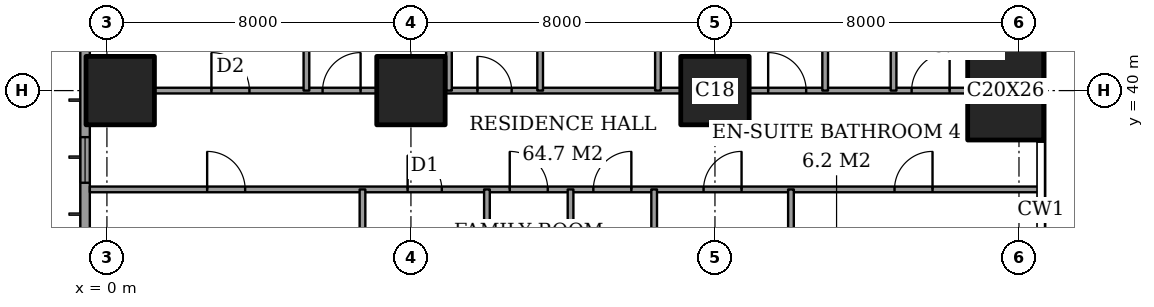
"""IFC4 building model, lengths in metres.
Left out: names, types, materials, properties, quantities, classifications, styles, units other than length and angle.
Written with IfcOpenShell. Run it as: python <this file> out.ifc"""

import sys

from ifc_helpers import new_model, si_unit, direction, frame, frame_2d, origin, origin_2d, place, context, subcontext, project, spatial, rectangle, extrude, element, fill, save


model = new_model("IFC4")
c1 = context("Model", 3, precision=1e-05, world=origin(), true_north=direction((0.0, 1.0)))
c2 = subcontext(c1, "Body", "Model", "MODEL_VIEW")
j1 = project(units=[si_unit("LENGTHUNIT", "METRE"), si_unit("PLANEANGLEUNIT", "RADIAN")], contexts=[c1])
p1 = place(None, origin())
s1 = spatial("IfcSite", under=j1, at=p1, CompositionType="ELEMENT")
p2 = place(p1, origin())
s2 = spatial("IfcBuilding", under=s1, at=p2, CompositionType="ELEMENT")
p3 = place(p2, frame((0.0, 0.0, 185.8)))
s3 = spatial("IfcBuildingStorey", under=s2, at=p3, CompositionType="ELEMENT", Elevation=185.8)
for number, where, z_axis, x_axis in (
    (1, (0.35, 40.0, 0.0), (0.0, 0.0, 1.0), (1.0, 0.0, 0.0)),
    (2, (8.0, 40.0, 0.0), (0.0, 0.0, 1.0), (1.0, 0.0, 0.0)),
    (3, (16.0, 40.0, 0.0), (0.0, 0.0, 1.0), (1.0, 0.0, 0.0)),
):
    element("IfcColumn", number, at=place(p3, frame(where, z_axis=z_axis, x_axis=x_axis)), inside=s3, PredefinedType="COLUMN", context=c2, shape_type="SweptSolid", body=[
        extrude(rectangle(XDim=1.8, YDim=1.8, at=origin_2d()), origin(), (0.0, 0.0, 1.0), 3.6),
    ])
p4 = place(p3, frame((23.65, 40.0, 0.0), z_axis=(0.0, 0.0, 1.0), x_axis=(1.0, 0.0, 0.0)))
e4 = element("IfcColumn", 4, at=p4, inside=s3, PredefinedType="COLUMN", context=c2, shape_type="SweptSolid", body=[
    extrude(rectangle(XDim=2.0, YDim=2.6, at=origin_2d()), origin(), (0.0, 0.0, 1.0), 3.6),
])
p5 = place(p3, frame((-0.575, 44.825, 0.0), z_axis=(0.0, 0.0, 1.0), x_axis=(0.0, -1.0, 0.0)))
e5 = element("IfcWall", 5, at=p5, inside=s3, PredefinedType="SOLIDWALL", context=c2, shape_type="SweptSolid", body=[
    extrude(rectangle(XDim=41.65, YDim=0.25, at=frame_2d((20.825, 0.0))), origin(), (0.0, 0.0, 1.0), 3.6),
])
p6 = place(p5, frame((0.825, 0.0, 0.2)))
e6 = element("IfcOpeningElement", 6, at=p6, cuts=e5, PredefinedType="OPENING", context=c2, shape_type="SweptSolid", body=[
    extrude(rectangle(XDim=2.4, YDim=2.4, at=frame_2d((1.2, 1.2))), frame((0.0, 0.135, 0.0), z_axis=(0.0, -1.0, 0.0), x_axis=(1.0, 0.0, 0.0)), (0.0, 0.0, 1.0), 0.27),
])
p7 = place(p5, frame((6.05, 0.0, 0.2)))
e7 = element("IfcOpeningElement", 7, at=p7, cuts=e5, PredefinedType="OPENING", context=c2, shape_type="SweptSolid", body=[
    extrude(rectangle(XDim=1.2, YDim=2.4, at=frame_2d((0.6, 1.2))), frame((0.0, 0.135, 0.0), z_axis=(0.0, -1.0, 0.0), x_axis=(1.0, 0.0, 0.0)), (0.0, 0.0, 1.0), 0.27),
])
p8 = place(p5, frame((8.475, 0.0, 0.2)))
e8 = element("IfcOpeningElement", 8, at=p8, cuts=e5, PredefinedType="OPENING", context=c2, shape_type="SweptSolid", body=[
    extrude(rectangle(XDim=2.4, YDim=2.4, at=frame_2d((1.2, 1.2))), frame((0.0, 0.135, 0.0), z_axis=(0.0, -1.0, 0.0), x_axis=(1.0, 0.0, 0.0)), (0.0, 0.0, 1.0), 0.27),
])
p9 = place(p5, frame((15.625, 0.0, 0.2)))
e9 = element("IfcOpeningElement", 9, at=p9, cuts=e5, PredefinedType="OPENING", context=c2, shape_type="SweptSolid", body=[
    extrude(rectangle(XDim=2.4, YDim=2.4, at=frame_2d((1.2, 1.2))), frame((0.0, 0.135, 0.0), z_axis=(0.0, -1.0, 0.0), x_axis=(1.0, 0.0, 0.0)), (0.0, 0.0, 1.0), 0.27),
])
p10 = place(p5, frame((23.625, 0.0, 0.2)))
e10 = element("IfcOpeningElement", 10, at=p10, cuts=e5, PredefinedType="OPENING", context=c2, shape_type="SweptSolid", body=[
    extrude(rectangle(XDim=2.4, YDim=2.4, at=frame_2d((1.2, 1.2))), frame((0.0, 0.135, 0.0), z_axis=(0.0, -1.0, 0.0), x_axis=(1.0, 0.0, 0.0)), (0.0, 0.0, 1.0), 0.27),
])
p11 = place(p5, frame((30.775, 0.0, 0.2)))
e11 = element("IfcOpeningElement", 11, at=p11, cuts=e5, PredefinedType="OPENING", context=c2, shape_type="SweptSolid", body=[
    extrude(rectangle(XDim=2.4, YDim=2.4, at=frame_2d((1.2, 1.2))), frame((0.0, 0.135, 0.0), z_axis=(0.0, -1.0, 0.0), x_axis=(1.0, 0.0, 0.0)), (0.0, 0.0, 1.0), 0.27),
])
p12 = place(p5, frame((34.55, 0.0, 0.2)))
e12 = element("IfcOpeningElement", 12, at=p12, cuts=e5, PredefinedType="OPENING", context=c2, shape_type="SweptSolid", body=[
    extrude(rectangle(XDim=1.2, YDim=2.4, at=frame_2d((0.6, 1.2))), frame((0.0, 0.135, 0.0), z_axis=(0.0, -1.0, 0.0), x_axis=(1.0, 0.0, 0.0)), (0.0, 0.0, 1.0), 0.27),
])
p13 = place(p5, frame((38.425, 0.0, 0.2)))
e13 = element("IfcOpeningElement", 13, at=p13, cuts=e5, PredefinedType="OPENING", context=c2, shape_type="SweptSolid", body=[
    extrude(rectangle(XDim=2.4, YDim=2.4, at=frame_2d((1.2, 1.2))), frame((0.0, 0.135, 0.0), z_axis=(0.0, -1.0, 0.0), x_axis=(1.0, 0.0, 0.0)), (0.0, 0.0, 1.0), 0.27),
])
p14 = place(p3, frame((-0.45, 37.4, 0.0), z_axis=(0.0, 0.0, 1.0), x_axis=(1.0, 0.0, 0.0)))
e14 = element("IfcWall", 14, at=p14, inside=s3, PredefinedType="PARTITIONING", context=c2, shape_type="SweptSolid", body=[
    extrude(rectangle(XDim=25.011, YDim=0.15, at=frame_2d((12.505, 0.0))), origin(), (0.0, 0.0, 1.0), 3.35),
])
p15 = place(p14, frame((13.25, 0.0, 0.0)))
e15 = element("IfcOpeningElement", 15, at=p15, cuts=e14, PredefinedType="OPENING", context=c2, shape_type="SweptSolid", body=[
    extrude(rectangle(XDim=1.0, YDim=2.1, at=frame_2d((0.5, 1.05))), frame((0.0, 0.085, 0.0), z_axis=(0.0, -1.0, 0.0), x_axis=(1.0, 0.0, 0.0)), (0.0, 0.0, 1.0), 0.17),
])
p16 = place(p14, frame((3.087, 0.0, 0.0)))
e16 = element("IfcOpeningElement", 16, at=p16, cuts=e14, PredefinedType="OPENING", context=c2, shape_type="SweptSolid", body=[
    extrude(rectangle(XDim=1.0, YDim=2.1, at=frame_2d((0.5, 1.05))), frame((0.0, 0.085, 0.0), z_axis=(0.0, -1.0, 0.0), x_axis=(1.0, 0.0, 0.0)), (0.0, 0.0, 1.0), 0.17),
])
p17 = place(p14, frame((8.363, 0.0, 0.0)))
e17 = element("IfcOpeningElement", 17, at=p17, cuts=e14, PredefinedType="OPENING", context=c2, shape_type="SweptSolid", body=[
    extrude(rectangle(XDim=0.9, YDim=2.1, at=frame_2d((0.45, 1.05))), frame((0.0, 0.085, 0.0), z_axis=(0.0, -1.0, 0.0), x_axis=(1.0, 0.0, 0.0)), (0.0, 0.0, 1.0), 0.17),
])
p18 = place(p14, frame((11.05, 0.0, 0.0)))
e18 = element("IfcOpeningElement", 18, at=p18, cuts=e14, PredefinedType="OPENING", context=c2, shape_type="SweptSolid", body=[
    extrude(rectangle(XDim=1.0, YDim=2.1, at=frame_2d((0.5, 1.05))), frame((0.0, 0.085, 0.0), z_axis=(0.0, -1.0, 0.0), x_axis=(1.0, 0.0, 0.0)), (0.0, 0.0, 1.0), 0.17),
])
p19 = place(p14, frame((16.15, 0.0, 0.0)))
e19 = element("IfcOpeningElement", 19, at=p19, cuts=e14, PredefinedType="OPENING", context=c2, shape_type="SweptSolid", body=[
    extrude(rectangle(XDim=1.0, YDim=2.1, at=frame_2d((0.5, 1.05))), frame((0.0, 0.085, 0.0), z_axis=(0.0, -1.0, 0.0), x_axis=(1.0, 0.0, 0.0)), (0.0, 0.0, 1.0), 0.17),
])
p20 = place(p14, frame((21.175, 0.0, 0.0)))
e20 = element("IfcOpeningElement", 20, at=p20, cuts=e14, PredefinedType="OPENING", context=c2, shape_type="SweptSolid", body=[
    extrude(rectangle(XDim=1.0, YDim=2.1, at=frame_2d((0.5, 1.05))), frame((0.0, 0.085, 0.0), z_axis=(0.0, -1.0, 0.0), x_axis=(1.0, 0.0, 0.0)), (0.0, 0.0, 1.0), 0.17),
])
p21 = place(p3, frame((1.25, 40.0, 0.0), z_axis=(0.0, 0.0, 1.0), x_axis=(1.0, 0.0, 0.0)))
e21 = element("IfcWall", 21, at=p21, inside=s3, PredefinedType="PARTITIONING", context=c2, shape_type="SweptSolid", body=[
    extrude(rectangle(XDim=5.85, YDim=0.15, at=frame_2d((2.925, 0.0))), origin(), (0.0, 0.0, 1.0), 3.35),
])
p22 = place(p21, frame((1.5, 0.0, 0.0)))
e22 = element("IfcOpeningElement", 22, at=p22, cuts=e21, PredefinedType="OPENING", context=c2, shape_type="SweptSolid", body=[
    extrude(rectangle(XDim=1.0, YDim=2.1, at=frame_2d((0.5, 1.05))), frame((0.0, 0.085, 0.0), z_axis=(0.0, -1.0, 0.0), x_axis=(1.0, 0.0, 0.0)), (0.0, 0.0, 1.0), 0.17),
])
p23 = place(p21, frame((4.425, 0.0, 0.0)))
e23 = element("IfcOpeningElement", 23, at=p23, cuts=e21, PredefinedType="OPENING", context=c2, shape_type="SweptSolid", body=[
    extrude(rectangle(XDim=1.0, YDim=2.1, at=frame_2d((0.5, 1.05))), frame((0.0, 0.085, 0.0), z_axis=(0.0, -1.0, 0.0), x_axis=(1.0, 0.0, 0.0)), (0.0, 0.0, 1.0), 0.17),
])
p24 = place(p3, frame((8.9, 40.0, 0.0), z_axis=(0.0, 0.0, 1.0), x_axis=(1.0, 0.0, 0.0)))
e24 = element("IfcWall", 24, at=p24, inside=s3, PredefinedType="PARTITIONING", context=c2, shape_type="SweptSolid", body=[
    extrude(rectangle(XDim=6.2, YDim=0.15, at=frame_2d((3.1, 0.0))), origin(), (0.0, 0.0, 1.0), 3.35),
])
p25 = place(p24, frame((0.85, 0.0, 0.0)))
e25 = element("IfcOpeningElement", 25, at=p25, cuts=e24, PredefinedType="OPENING", context=c2, shape_type="SweptSolid", body=[
    extrude(rectangle(XDim=0.9, YDim=2.1, at=frame_2d((0.45, 1.05))), frame((0.0, 0.085, 0.0), z_axis=(0.0, -1.0, 0.0), x_axis=(1.0, 0.0, 0.0)), (0.0, 0.0, 1.0), 0.17),
])
p26 = place(p3, frame((16.9, 40.0, 0.0), z_axis=(0.0, 0.0, 1.0), x_axis=(1.0, 0.0, 0.0)))
e26 = element("IfcWall", 26, at=p26, inside=s3, PredefinedType="PARTITIONING", context=c2, shape_type="SweptSolid", body=[
    extrude(rectangle(XDim=5.75, YDim=0.15, at=frame_2d((2.875, 0.0))), origin(), (0.0, 0.0, 1.0), 3.35),
])
p27 = place(p26, frame((0.5, 0.0, 0.0)))
e27 = element("IfcOpeningElement", 27, at=p27, cuts=e26, PredefinedType="OPENING", context=c2, shape_type="SweptSolid", body=[
    extrude(rectangle(XDim=1.0, YDim=2.1, at=frame_2d((0.5, 1.05))), frame((0.0, 0.085, 0.0), z_axis=(0.0, -1.0, 0.0), x_axis=(1.0, 0.0, 0.0)), (0.0, 0.0, 1.0), 0.17),
])
p28 = place(p26, frame((4.275, 0.0, 0.0)))
e28 = element("IfcOpeningElement", 28, at=p28, cuts=e26, PredefinedType="OPENING", context=c2, shape_type="SweptSolid", body=[
    extrude(rectangle(XDim=1.0, YDim=2.1, at=frame_2d((0.5, 1.05))), frame((0.0, 0.085, 0.0), z_axis=(0.0, -1.0, 0.0), x_axis=(1.0, 0.0, 0.0)), (0.0, 0.0, 1.0), 0.17),
])
p29 = place(p3, frame((5.25, 40.0, 0.0), z_axis=(0.0, 0.0, 1.0), x_axis=(0.0, 1.0, 0.0)))
e29 = element("IfcWall", 29, at=p29, inside=s3, PredefinedType="PARTITIONING", context=c2, shape_type="SweptSolid", body=[
    extrude(rectangle(XDim=8.45, YDim=0.15, at=frame_2d((4.225, 0.0))), origin(), (0.0, 0.0, 1.0), 3.35),
])
p30 = place(p3, frame((6.725, 33.2, 0.0), z_axis=(0.0, 0.0, 1.0), x_axis=(0.0, 1.0, 0.0)))
e30 = element("IfcWall", 30, at=p30, inside=s3, PredefinedType="PARTITIONING", context=c2, shape_type="SweptSolid", body=[
    extrude(rectangle(XDim=4.2, YDim=0.15, at=frame_2d((2.1, 0.0))), origin(), (0.0, 0.0, 1.0), 3.35),
])
p31 = place(p3, frame((9.0, 40.0, 0.0), z_axis=(0.0, 0.0, 1.0), x_axis=(0.0, 1.0, 0.0)))
e31 = element("IfcWall", 31, at=p31, inside=s3, PredefinedType="PARTITIONING", context=c2, shape_type="SweptSolid", body=[
    extrude(rectangle(XDim=8.45, YDim=0.15, at=frame_2d((4.225, 0.0))), origin(), (0.0, 0.0, 1.0), 3.35),
])
p32 = place(p3, frame((10.0, 28.0, 0.0), z_axis=(0.0, 0.0, 1.0), x_axis=(0.0, 1.0, 0.0)))
e32 = element("IfcWall", 32, at=p32, inside=s3, PredefinedType="PARTITIONING", context=c2, shape_type="SweptSolid", body=[
    extrude(rectangle(XDim=9.4, YDim=0.15, at=frame_2d((4.7, 0.0))), origin(), (0.0, 0.0, 1.0), 3.35),
])
p33 = place(p32, frame((0.5, 0.0, 0.0)))
e33 = element("IfcOpeningElement", 33, at=p33, cuts=e32, PredefinedType="OPENING", context=c2, shape_type="SweptSolid", body=[
    extrude(rectangle(XDim=1.0, YDim=2.1, at=frame_2d((0.5, 1.05))), frame((0.0, 0.085, 0.0), z_axis=(0.0, -1.0, 0.0), x_axis=(1.0, 0.0, 0.0)), (0.0, 0.0, 1.0), 0.17),
])
p34 = place(p3, frame((11.4, 40.0, 0.0), z_axis=(0.0, 0.0, 1.0), x_axis=(0.0, 1.0, 0.0)))
e34 = element("IfcWall", 34, at=p34, inside=s3, PredefinedType="PARTITIONING", context=c2, shape_type="SweptSolid", body=[
    extrude(rectangle(XDim=8.45, YDim=0.15, at=frame_2d((4.225, 0.0))), origin(), (0.0, 0.0, 1.0), 3.35),
])
for number, where, z_axis, x_axis in (
    (35, (12.2, 30.0, 0.0), (0.0, 0.0, 1.0), (0.0, 1.0, 0.0)),
    (36, (14.4, 30.0, 0.0), (0.0, 0.0, 1.0), (0.0, 1.0, 0.0)),
):
    element("IfcWall", number, at=place(p3, frame(where, z_axis=z_axis, x_axis=x_axis)), inside=s3, PredefinedType="PARTITIONING", context=c2, shape_type="SweptSolid", body=[
        extrude(rectangle(XDim=7.4, YDim=0.15, at=frame_2d((3.7, 0.0))), origin(), (0.0, 0.0, 1.0), 3.35),
    ])
p35 = place(p3, frame((14.5, 40.0, 0.0), z_axis=(0.0, 0.0, 1.0), x_axis=(0.0, 1.0, 0.0)))
e37 = element("IfcWall", 37, at=p35, inside=s3, PredefinedType="PARTITIONING", context=c2, shape_type="SweptSolid", body=[
    extrude(rectangle(XDim=8.45, YDim=0.15, at=frame_2d((4.225, 0.0))), origin(), (0.0, 0.0, 1.0), 3.35),
])
p36 = place(p35, frame((3.775, 0.0, 0.0)))
e38 = element("IfcOpeningElement", 38, at=p36, cuts=e37, PredefinedType="OPENING", context=c2, shape_type="SweptSolid", body=[
    extrude(rectangle(XDim=0.9, YDim=2.1, at=frame_2d((0.45, 1.05))), frame((0.0, 0.085, 0.0), z_axis=(0.0, -1.0, 0.0), x_axis=(1.0, 0.0, 0.0)), (0.0, 0.0, 1.0), 0.17),
])
p37 = place(p3, frame((18.0, 28.0, 0.0), z_axis=(0.0, 0.0, 1.0), x_axis=(0.0, 1.0, 0.0)))
e39 = element("IfcWall", 39, at=p37, inside=s3, PredefinedType="PARTITIONING", context=c2, shape_type="SweptSolid", body=[
    extrude(rectangle(XDim=9.4, YDim=0.15, at=frame_2d((4.7, 0.0))), origin(), (0.0, 0.0, 1.0), 3.35),
])
p38 = place(p37, frame((0.55, 0.0, 0.0)))
e40 = element("IfcOpeningElement", 40, at=p38, cuts=e39, PredefinedType="OPENING", context=c2, shape_type="SweptSolid", body=[
    extrude(rectangle(XDim=0.9, YDim=2.1, at=frame_2d((0.45, 1.05))), frame((0.0, 0.085, 0.0), z_axis=(0.0, -1.0, 0.0), x_axis=(1.0, 0.0, 0.0)), (0.0, 0.0, 1.0), 0.17),
])
p39 = place(p3, frame((18.9, 40.0, 0.0), z_axis=(0.0, 0.0, 1.0), x_axis=(0.0, 1.0, 0.0)))
e41 = element("IfcWall", 41, at=p39, inside=s3, PredefinedType="PARTITIONING", context=c2, shape_type="SweptSolid", body=[
    extrude(rectangle(XDim=8.45, YDim=0.15, at=frame_2d((4.225, 0.0))), origin(), (0.0, 0.0, 1.0), 3.35),
])
p40 = place(p3, frame((20.7, 40.0, 0.0), z_axis=(0.0, 0.0, 1.0), x_axis=(0.0, 1.0, 0.0)))
e42 = element("IfcWall", 42, at=p40, inside=s3, PredefinedType="PARTITIONING", context=c2, shape_type="SweptSolid", body=[
    extrude(rectangle(XDim=8.45, YDim=0.15, at=frame_2d((4.225, 0.0))), origin(), (0.0, 0.0, 1.0), 3.35),
])
p41 = place(p40, frame((3.775, 0.0, 0.0)))
e43 = element("IfcOpeningElement", 43, at=p41, cuts=e42, PredefinedType="OPENING", context=c2, shape_type="SweptSolid", body=[
    extrude(rectangle(XDim=0.9, YDim=2.1, at=frame_2d((0.45, 1.05))), frame((0.0, 0.085, 0.0), z_axis=(0.0, -1.0, 0.0), x_axis=(1.0, 0.0, 0.0)), (0.0, 0.0, 1.0), 0.17),
])
p42 = place(p7, origin())
e44 = element("IfcWindow", 44, at=p42, inside=s3, PartitioningType="SINGLE_PANEL", PredefinedType="WINDOW", context=c2, shape_type="SweptSolid", body=[
    extrude(rectangle(XDim=1.2, YDim=2.4, at=frame_2d((0.6, 1.2))), frame((0.0, 0.03, 0.0), z_axis=(0.0, -1.0, 0.0), x_axis=(1.0, 0.0, 0.0)), (0.0, 0.0, 1.0), 0.06),
])
fill(e7, e44)
p43 = place(p22, origin())
e45 = element("IfcDoor", 45, at=p43, inside=s3, OperationType="SINGLE_SWING_RIGHT", PredefinedType="DOOR", context=c2, shape_type="SweptSolid", body=[
    extrude(rectangle(XDim=1.0, YDim=2.1, at=frame_2d((0.5, 1.05))), frame((0.0, 0.025, 0.0), z_axis=(0.0, -1.0, 0.0), x_axis=(1.0, 0.0, 0.0)), (0.0, 0.0, 1.0), 0.05),
])
fill(e22, e45)
p44 = place(p23, origin())
e46 = element("IfcDoor", 46, at=p44, inside=s3, OperationType="SINGLE_SWING_LEFT", PredefinedType="DOOR", context=c2, shape_type="SweptSolid", body=[
    extrude(rectangle(XDim=1.0, YDim=2.1, at=frame_2d((0.5, 1.05))), frame((0.0, 0.025, 0.0), z_axis=(0.0, -1.0, 0.0), x_axis=(1.0, 0.0, 0.0)), (0.0, 0.0, 1.0), 0.05),
])
fill(e23, e46)
p45 = place(p25, origin())
e47 = element("IfcDoor", 47, at=p45, inside=s3, OperationType="SINGLE_SWING_RIGHT", PredefinedType="DOOR", context=c2, shape_type="SweptSolid", body=[
    extrude(rectangle(XDim=0.9, YDim=2.1, at=frame_2d((0.45, 1.05))), frame((0.0, 0.025, 0.0), z_axis=(0.0, -1.0, 0.0), x_axis=(1.0, 0.0, 0.0)), (0.0, 0.0, 1.0), 0.05),
])
fill(e25, e47)
p46 = place(p27, origin())
e48 = element("IfcDoor", 48, at=p46, inside=s3, OperationType="SINGLE_SWING_RIGHT", PredefinedType="DOOR", context=c2, shape_type="SweptSolid", body=[
    extrude(rectangle(XDim=1.0, YDim=2.1, at=frame_2d((0.5, 1.05))), frame((0.0, 0.025, 0.0), z_axis=(0.0, -1.0, 0.0), x_axis=(1.0, 0.0, 0.0)), (0.0, 0.0, 1.0), 0.05),
])
fill(e27, e48)
p47 = place(p28, origin())
e49 = element("IfcDoor", 49, at=p47, inside=s3, OperationType="SINGLE_SWING_LEFT", PredefinedType="DOOR", context=c2, shape_type="SweptSolid", body=[
    extrude(rectangle(XDim=1.0, YDim=2.1, at=frame_2d((0.5, 1.05))), frame((0.0, 0.025, 0.0), z_axis=(0.0, -1.0, 0.0), x_axis=(1.0, 0.0, 0.0)), (0.0, 0.0, 1.0), 0.05),
])
fill(e28, e49)
p48 = place(p15, origin())
e50 = element("IfcDoor", 50, at=p48, inside=s3, OperationType="SINGLE_SWING_LEFT", PredefinedType="DOOR", context=c2, shape_type="SweptSolid", body=[
    extrude(rectangle(XDim=1.0, YDim=2.1, at=frame_2d((0.5, 1.05))), frame((0.0, 0.025, 0.0), z_axis=(0.0, -1.0, 0.0), x_axis=(1.0, 0.0, 0.0)), (0.0, 0.0, 1.0), 0.05),
])
fill(e15, e50)
p49 = place(p16, origin())
e51 = element("IfcDoor", 51, at=p49, inside=s3, OperationType="SINGLE_SWING_RIGHT", PredefinedType="DOOR", context=c2, shape_type="SweptSolid", body=[
    extrude(rectangle(XDim=1.0, YDim=2.1, at=frame_2d((0.5, 1.05))), frame((0.0, 0.025, 0.0), z_axis=(0.0, -1.0, 0.0), x_axis=(1.0, 0.0, 0.0)), (0.0, 0.0, 1.0), 0.05),
])
fill(e16, e51)
p50 = place(p17, origin())
e52 = element("IfcDoor", 52, at=p50, inside=s3, OperationType="SINGLE_SWING_RIGHT", PredefinedType="DOOR", context=c2, shape_type="SweptSolid", body=[
    extrude(rectangle(XDim=0.9, YDim=2.1, at=frame_2d((0.45, 1.05))), frame((0.0, 0.025, 0.0), z_axis=(0.0, -1.0, 0.0), x_axis=(1.0, 0.0, 0.0)), (0.0, 0.0, 1.0), 0.05),
])
fill(e17, e52)
p51 = place(p18, origin())
e53 = element("IfcDoor", 53, at=p51, inside=s3, OperationType="SINGLE_SWING_RIGHT", PredefinedType="DOOR", context=c2, shape_type="SweptSolid", body=[
    extrude(rectangle(XDim=1.0, YDim=2.1, at=frame_2d((0.5, 1.05))), frame((0.0, 0.025, 0.0), z_axis=(0.0, -1.0, 0.0), x_axis=(1.0, 0.0, 0.0)), (0.0, 0.0, 1.0), 0.05),
])
fill(e18, e53)
p52 = place(p19, origin())
e54 = element("IfcDoor", 54, at=p52, inside=s3, OperationType="SINGLE_SWING_LEFT", PredefinedType="DOOR", context=c2, shape_type="SweptSolid", body=[
    extrude(rectangle(XDim=1.0, YDim=2.1, at=frame_2d((0.5, 1.05))), frame((0.0, 0.025, 0.0), z_axis=(0.0, -1.0, 0.0), x_axis=(1.0, 0.0, 0.0)), (0.0, 0.0, 1.0), 0.05),
])
fill(e19, e54)
p53 = place(p20, origin())
e55 = element("IfcDoor", 55, at=p53, inside=s3, OperationType="SINGLE_SWING_LEFT", PredefinedType="DOOR", context=c2, shape_type="SweptSolid", body=[
    extrude(rectangle(XDim=1.0, YDim=2.1, at=frame_2d((0.5, 1.05))), frame((0.0, 0.025, 0.0), z_axis=(0.0, -1.0, 0.0), x_axis=(1.0, 0.0, 0.0)), (0.0, 0.0, 1.0), 0.05),
])
fill(e20, e55)
save(model, sys.argv[1])
